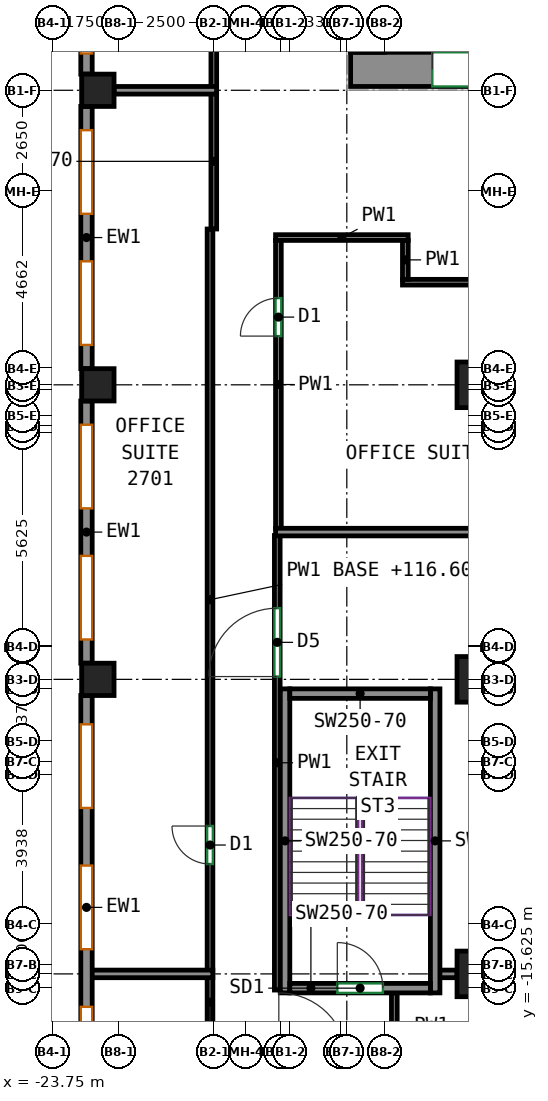
"""IFC4 building model, lengths in metres.
Left out: names, types, materials, properties, quantities, classifications, styles, units other than length and angle.
Written with IfcOpenShell. Run it as: python <this file> out.ifc"""

import sys

from ifc_helpers import new_model, si_unit, direction, frame, frame_2d, origin, origin_2d, place, context, subcontext, project, spatial, rectangle, extrude, source, transform, mapped, element, fill, save


model = new_model("IFC4")
c1 = context("Model", 3, precision=1e-05, world=origin(), true_north=direction((0.0, 1.0)))
c2 = subcontext(c1, "Body", "Model", "MODEL_VIEW")
j1 = project(units=[si_unit("LENGTHUNIT", "METRE"), si_unit("PLANEANGLEUNIT", "RADIAN")], contexts=[c1])
p1 = place(None, origin())
s1 = spatial("IfcSite", under=j1, at=p1, CompositionType="ELEMENT")
p2 = place(p1, origin())
s2 = spatial("IfcBuilding", under=s1, at=p2, CompositionType="ELEMENT")
p3 = place(p2, frame((0.0, 0.0, 116.6)))
s3 = spatial("IfcBuildingStorey", under=s2, at=p3, CompositionType="ELEMENT", Elevation=116.6)
m1 = source(origin(), c2, "Body", "SweptSolid", [
    extrude(rectangle(XDim=0.85, YDim=0.85, at=origin_2d()), origin(), (0.0, 0.0, 1.0), 3.72),
])
for number, where, z_axis, x_axis in (
    (1, (-22.55, -7.5, 0.0), (0.0, 0.0, 1.0), (1.0, 0.0, 0.0)),
    (2, (-22.55, 0.25, 0.0), (0.0, 0.0, 1.0), (1.0, 0.0, 0.0)),
    (3, (-22.55, 8.0, 0.0), (0.0, 0.0, 1.0), (1.0, 0.0, 0.0)),
):
    element("IfcColumn", number, at=place(p3, frame(where, z_axis=z_axis, x_axis=x_axis)), inside=s3, PredefinedType="COLUMN", context=c2, shape_type="MappedRepresentation", body=[
        mapped(m1, transform((0.0, 0.0, 0.0))),
    ])
m2 = source(origin(), c2, "Body", "SweptSolid", [
    extrude(rectangle(XDim=1.2, YDim=1.2, at=origin_2d()), origin(), (0.0, 0.0, 1.0), 3.72),
])
for number, where, z_axis, x_axis in (
    (4, (-12.5, -15.25, 0.0), (0.0, 0.0, 1.0), (1.0, 0.0, 0.0)),
    (5, (-12.5, -7.5, 0.0), (0.0, 0.0, 1.0), (1.0, 0.0, 0.0)),
    (6, (-12.5, 0.25, 0.0), (0.0, 0.0, 1.0), (1.0, 0.0, 0.0)),
):
    element("IfcColumn", number, at=place(p3, frame(where, z_axis=z_axis, x_axis=x_axis)), inside=s3, PredefinedType="COLUMN", context=c2, shape_type="MappedRepresentation", body=[
        mapped(m2, transform((0.0, 0.0, 0.0))),
    ])
m3 = source(origin(), c2, "Body", "SweptSolid", [
    extrude(rectangle(XDim=5.53, YDim=0.9, at=frame_2d((2.765, 0.0))), origin(), (0.0, 0.0, 1.0), 3.72),
])
p4 = place(p3, frame((-15.9, 8.55, 0.0), z_axis=(0.0, 0.0, 1.0), x_axis=(1.0, 0.0, 0.0)))
e7 = element("IfcWall", 7, at=p4, inside=s3, PredefinedType="SHEAR", context=c2, shape_type="MappedRepresentation", body=[
    mapped(m3, transform((0.0, 0.0, 0.0))),
])
p5 = place(p4, frame((2.15, 0.0, 0.0)))
e8 = element("IfcOpeningElement", 8, at=p5, cuts=e7, PredefinedType="OPENING", context=c2, shape_type="SweptSolid", body=[
    extrude(rectangle(XDim=1.2, YDim=2.1, at=frame_2d((0.6, 1.05))), frame((0.0, 0.46, 0.0), z_axis=(0.0, -1.0, 0.0), x_axis=(1.0, 0.0, 0.0)), (0.0, 0.0, 1.0), 0.92),
])
m4 = source(origin(), c2, "Body", "SweptSolid", [
    extrude(rectangle(XDim=8.0, YDim=0.25, at=frame_2d((4.0, 0.0))), origin(), (0.0, 0.0, 1.0), 3.72),
])
for number, where, z_axis, x_axis in (
    (9, (-17.625, -15.75, 0.0), (0.0, 0.0, 1.0), (0.0, 1.0, 0.0)),
    (10, (-13.675, -15.75, 0.0), (0.0, 0.0, 1.0), (0.0, 1.0, 0.0)),
):
    element("IfcWall", number, at=place(p3, frame(where, z_axis=z_axis, x_axis=x_axis)), inside=s3, PredefinedType="SHEAR", context=c2, shape_type="MappedRepresentation", body=[
        mapped(m4, transform((0.0, 0.0, 0.0))),
    ])
m5 = source(origin(), c2, "Body", "SweptSolid", [
    extrude(rectangle(XDim=3.7, YDim=0.25, at=frame_2d((1.85, 0.0))), origin(), (0.0, 0.0, 1.0), 3.72),
])
p6 = place(p3, frame((-17.5, -15.625, 0.0), z_axis=(0.0, 0.0, 1.0), x_axis=(1.0, 0.0, 0.0)))
e11 = element("IfcWall", 11, at=p6, inside=s3, PredefinedType="SHEAR", context=c2, shape_type="MappedRepresentation", body=[
    mapped(m5, transform((0.0, 0.0, 0.0))),
])
p7 = place(p6, frame((1.25, 0.0, 0.0)))
e12 = element("IfcOpeningElement", 12, at=p7, cuts=e11, PredefinedType="OPENING", context=c2, shape_type="SweptSolid", body=[
    extrude(rectangle(XDim=1.2, YDim=2.1, at=frame_2d((0.6, 1.05))), frame((0.0, 0.135, 0.0), z_axis=(0.0, -1.0, 0.0), x_axis=(1.0, 0.0, 0.0)), (0.0, 0.0, 1.0), 0.27),
])
p8 = place(p3, frame((-17.5, -7.875, 0.0), z_axis=(0.0, 0.0, 1.0), x_axis=(1.0, 0.0, 0.0)))
e13 = element("IfcWall", 13, at=p8, inside=s3, PredefinedType="SHEAR", context=c2, shape_type="MappedRepresentation", body=[
    mapped(m5, transform((0.0, 0.0, 0.0))),
])
m6 = source(origin(), c2, "Body", "SweptSolid", [
    extrude(rectangle(XDim=13.15, YDim=0.3, at=frame_2d((6.575, 0.0))), origin(), (0.0, 0.0, 1.0), 3.72),
])
p9 = place(p3, frame((-22.85, 21.575, 0.0), z_axis=(0.0, 0.0, 1.0), x_axis=(0.0, -1.0, 0.0)))
e14 = element("IfcWall", 14, at=p9, inside=s3, PredefinedType="SOLIDWALL", context=c2, shape_type="MappedRepresentation", body=[
    mapped(m6, transform((0.0, 0.0, 0.0))),
])
p10 = place(p9, frame((0.544, 0.0, 0.7)))
e15 = element("IfcOpeningElement", 15, at=p10, cuts=e14, PredefinedType="OPENING", context=c2, shape_type="SweptSolid", body=[
    extrude(rectangle(XDim=2.2, YDim=2.25, at=frame_2d((1.1, 1.125))), frame((0.0, 0.16, 0.0), z_axis=(0.0, -1.0, 0.0), x_axis=(1.0, 0.0, 0.0)), (0.0, 0.0, 1.0), 0.32),
])
p11 = place(p9, frame((3.831, 0.0, 0.7)))
e16 = element("IfcOpeningElement", 16, at=p11, cuts=e14, PredefinedType="OPENING", context=c2, shape_type="SweptSolid", body=[
    extrude(rectangle(XDim=2.2, YDim=2.25, at=frame_2d((1.1, 1.125))), frame((0.0, 0.16, 0.0), z_axis=(0.0, -1.0, 0.0), x_axis=(1.0, 0.0, 0.0)), (0.0, 0.0, 1.0), 0.32),
])
p12 = place(p9, frame((7.119, 0.0, 0.7)))
e17 = element("IfcOpeningElement", 17, at=p12, cuts=e14, PredefinedType="OPENING", context=c2, shape_type="SweptSolid", body=[
    extrude(rectangle(XDim=2.2, YDim=2.25, at=frame_2d((1.1, 1.125))), frame((0.0, 0.16, 0.0), z_axis=(0.0, -1.0, 0.0), x_axis=(1.0, 0.0, 0.0)), (0.0, 0.0, 1.0), 0.32),
])
p13 = place(p9, frame((10.406, 0.0, 0.7)))
e18 = element("IfcOpeningElement", 18, at=p13, cuts=e14, PredefinedType="OPENING", context=c2, shape_type="SweptSolid", body=[
    extrude(rectangle(XDim=2.2, YDim=2.25, at=frame_2d((1.1, 1.125))), frame((0.0, 0.16, 0.0), z_axis=(0.0, -1.0, 0.0), x_axis=(1.0, 0.0, 0.0)), (0.0, 0.0, 1.0), 0.32),
])
m7 = source(origin(), c2, "Body", "SweptSolid", [
    extrude(rectangle(XDim=6.9, YDim=0.3, at=frame_2d((3.45, 0.0))), origin(), (0.0, 0.0, 1.0), 3.72),
])
p14 = place(p3, frame((-22.85, 7.575, 0.0), z_axis=(0.0, 0.0, 1.0), x_axis=(0.0, -1.0, 0.0)))
e19 = element("IfcWall", 19, at=p14, inside=s3, PredefinedType="SOLIDWALL", context=c2, shape_type="MappedRepresentation", body=[
    mapped(m7, transform((0.0, 0.0, 0.0))),
])
p15 = place(p14, frame((0.625, 0.0, 0.7)))
e20 = element("IfcOpeningElement", 20, at=p15, cuts=e19, PredefinedType="OPENING", context=c2, shape_type="SweptSolid", body=[
    extrude(rectangle(XDim=2.2, YDim=2.25, at=frame_2d((1.1, 1.125))), frame((0.0, 0.16, 0.0), z_axis=(0.0, -1.0, 0.0), x_axis=(1.0, 0.0, 0.0)), (0.0, 0.0, 1.0), 0.32),
])
p16 = place(p14, frame((4.075, 0.0, 0.7)))
e21 = element("IfcOpeningElement", 21, at=p16, cuts=e19, PredefinedType="OPENING", context=c2, shape_type="SweptSolid", body=[
    extrude(rectangle(XDim=2.2, YDim=2.25, at=frame_2d((1.1, 1.125))), frame((0.0, 0.16, 0.0), z_axis=(0.0, -1.0, 0.0), x_axis=(1.0, 0.0, 0.0)), (0.0, 0.0, 1.0), 0.32),
])
p17 = place(p3, frame((-22.85, -0.175, 0.0), z_axis=(0.0, 0.0, 1.0), x_axis=(0.0, -1.0, 0.0)))
e22 = element("IfcWall", 22, at=p17, inside=s3, PredefinedType="SOLIDWALL", context=c2, shape_type="MappedRepresentation", body=[
    mapped(m7, transform((0.0, 0.0, 0.0))),
])
p18 = place(p17, frame((0.625, 0.0, 0.7)))
e23 = element("IfcOpeningElement", 23, at=p18, cuts=e22, PredefinedType="OPENING", context=c2, shape_type="SweptSolid", body=[
    extrude(rectangle(XDim=2.2, YDim=2.25, at=frame_2d((1.1, 1.125))), frame((0.0, 0.16, 0.0), z_axis=(0.0, -1.0, 0.0), x_axis=(1.0, 0.0, 0.0)), (0.0, 0.0, 1.0), 0.32),
])
p19 = place(p17, frame((4.075, 0.0, 0.7)))
e24 = element("IfcOpeningElement", 24, at=p19, cuts=e22, PredefinedType="OPENING", context=c2, shape_type="SweptSolid", body=[
    extrude(rectangle(XDim=2.2, YDim=2.25, at=frame_2d((1.1, 1.125))), frame((0.0, 0.16, 0.0), z_axis=(0.0, -1.0, 0.0), x_axis=(1.0, 0.0, 0.0)), (0.0, 0.0, 1.0), 0.32),
])
m8 = source(origin(), c2, "Body", "SweptSolid", [
    extrude(rectangle(XDim=11.15, YDim=0.3, at=frame_2d((5.575, 0.0))), origin(), (0.0, 0.0, 1.0), 3.72),
])
p20 = place(p3, frame((-22.85, -7.925, 0.0), z_axis=(0.0, 0.0, 1.0), x_axis=(0.0, -1.0, 0.0)))
e25 = element("IfcWall", 25, at=p20, inside=s3, PredefinedType="SOLIDWALL", context=c2, shape_type="MappedRepresentation", body=[
    mapped(m8, transform((0.0, 0.0, 0.0))),
])
p21 = place(p20, frame((0.758, 0.0, 0.7)))
e26 = element("IfcOpeningElement", 26, at=p21, cuts=e25, PredefinedType="OPENING", context=c2, shape_type="SweptSolid", body=[
    extrude(rectangle(XDim=2.2, YDim=2.25, at=frame_2d((1.1, 1.125))), frame((0.0, 0.16, 0.0), z_axis=(0.0, -1.0, 0.0), x_axis=(1.0, 0.0, 0.0)), (0.0, 0.0, 1.0), 0.32),
])
p22 = place(p20, frame((4.475, 0.0, 0.7)))
e27 = element("IfcOpeningElement", 27, at=p22, cuts=e25, PredefinedType="OPENING", context=c2, shape_type="SweptSolid", body=[
    extrude(rectangle(XDim=2.2, YDim=2.25, at=frame_2d((1.1, 1.125))), frame((0.0, 0.16, 0.0), z_axis=(0.0, -1.0, 0.0), x_axis=(1.0, 0.0, 0.0)), (0.0, 0.0, 1.0), 0.32),
])
p23 = place(p20, frame((8.192, 0.0, 0.7)))
e28 = element("IfcOpeningElement", 28, at=p23, cuts=e25, PredefinedType="OPENING", context=c2, shape_type="SweptSolid", body=[
    extrude(rectangle(XDim=2.2, YDim=2.25, at=frame_2d((1.1, 1.125))), frame((0.0, 0.16, 0.0), z_axis=(0.0, -1.0, 0.0), x_axis=(1.0, 0.0, 0.0)), (0.0, 0.0, 1.0), 0.32),
])
p24 = place(p3, frame((-19.6, -15.16, 0.0), z_axis=(0.0, 0.0, 1.0), x_axis=(0.0, 1.0, 0.0)))
e29 = element("IfcWall", 29, at=p24, inside=s3, PredefinedType="PARTITIONING", context=c2, shape_type="SweptSolid", body=[
    extrude(rectangle(XDim=19.51, YDim=0.15, at=frame_2d((9.755, 0.0))), origin(), (0.0, 0.0, 1.0), 3.07),
])
p25 = place(p24, frame((2.801, 0.0, 0.0)))
e30 = element("IfcOpeningElement", 30, at=p25, cuts=e29, PredefinedType="OPENING", context=c2, shape_type="SweptSolid", body=[
    extrude(rectangle(XDim=1.0, YDim=2.1, at=frame_2d((0.5, 1.05))), frame((0.0, 0.085, 0.0), z_axis=(0.0, -1.0, 0.0), x_axis=(1.0, 0.0, 0.0)), (0.0, 0.0, 1.0), 0.17),
])
p26 = place(p3, frame((-19.5, 4.35, 0.0), z_axis=(0.0, 0.0, 1.0), x_axis=(0.0, 1.0, 0.0)))
e31 = element("IfcWall", 31, at=p26, inside=s3, PredefinedType="PARTITIONING", context=c2, shape_type="SweptSolid", body=[
    extrude(rectangle(XDim=3.56, YDim=0.15, at=frame_2d((1.78, 0.0))), origin(), (0.0, 0.0, 1.0), 3.07),
])
p27 = place(p3, frame((-14.535, 2.95, 0.0), z_axis=(0.0, 0.0, 1.0), x_axis=(1.0, 0.0, 0.0)))
e32 = element("IfcWall", 32, at=p27, inside=s3, PredefinedType="PARTITIONING", context=c2, shape_type="SweptSolid", body=[
    extrude(rectangle(XDim=12.635, YDim=0.15, at=frame_2d((6.317, 0.0))), origin(), (0.0, 0.0, 1.0), 3.72),
])
p28 = place(p27, frame((10.333, 0.0, 0.0)))
e33 = element("IfcOpeningElement", 33, at=p28, cuts=e32, PredefinedType="OPENING", context=c2, shape_type="SweptSolid", body=[
    extrude(rectangle(XDim=0.9, YDim=2.1, at=frame_2d((0.45, 1.05))), frame((0.0, 0.085, 0.0), z_axis=(0.0, -1.0, 0.0), x_axis=(1.0, 0.0, 0.0)), (0.0, 0.0, 1.0), 0.17),
])
p29 = place(p3, frame((-14.46, 4.05, 0.0), z_axis=(0.0, 0.0, 1.0), x_axis=(0.0, -1.0, 0.0)))
e34 = element("IfcWall", 34, at=p29, inside=s3, PredefinedType="PARTITIONING", context=c2, shape_type="SweptSolid", body=[
    extrude(rectangle(XDim=1.025, YDim=0.15, at=frame_2d((0.513, 0.0))), origin(), (0.0, 0.0, 1.0), 3.72),
])
p30 = place(p3, frame((-17.875, 4.125, 0.0), z_axis=(0.0, 0.0, 1.0), x_axis=(1.0, 0.0, 0.0)))
e35 = element("IfcWall", 35, at=p30, inside=s3, PredefinedType="PARTITIONING", context=c2, shape_type="SweptSolid", body=[
    extrude(rectangle(XDim=3.49, YDim=0.15, at=frame_2d((1.745, 0.0))), origin(), (0.0, 0.0, 1.0), 3.72),
])
p31 = place(p3, frame((-17.8, -3.535, 0.0), z_axis=(0.0, 0.0, 1.0), x_axis=(0.0, 1.0, 0.0)))
e36 = element("IfcWall", 36, at=p31, inside=s3, PredefinedType="PARTITIONING", context=c2, shape_type="SweptSolid", body=[
    extrude(rectangle(XDim=7.585, YDim=0.15, at=frame_2d((3.792, 0.0))), origin(), (0.0, 0.0, 1.0), 3.72),
])
p32 = place(p31, frame((5.067, 0.0, 0.0)))
e37 = element("IfcOpeningElement", 37, at=p32, cuts=e36, PredefinedType="OPENING", context=c2, shape_type="SweptSolid", body=[
    extrude(rectangle(XDim=1.0, YDim=2.1, at=frame_2d((0.5, 1.05))), frame((0.0, 0.085, 0.0), z_axis=(0.0, -1.0, 0.0), x_axis=(1.0, 0.0, 0.0)), (0.0, 0.0, 1.0), 0.17),
])
p33 = place(p3, frame((-17.83, -15.675, 0.0), z_axis=(0.0, 0.0, 1.0), x_axis=(0.0, 1.0, 0.0)))
e38 = element("IfcWall", 38, at=p33, inside=s3, PredefinedType="PARTITIONING", context=c2, shape_type="SweptSolid", body=[
    extrude(rectangle(XDim=11.96, YDim=0.15, at=frame_2d((5.98, 0.0))), origin(), (0.0, 0.0, 1.0), 3.72),
])
p34 = place(p33, frame((8.249, 0.0, 0.0)))
e39 = element("IfcOpeningElement", 39, at=p34, cuts=e38, PredefinedType="OPENING", context=c2, shape_type="SweptSolid", body=[
    extrude(rectangle(XDim=1.8, YDim=2.1, at=frame_2d((0.9, 1.05))), frame((0.0, 0.085, 0.0), z_axis=(0.0, -1.0, 0.0), x_axis=(1.0, 0.0, 0.0)), (0.0, 0.0, 1.0), 0.17),
])
p35 = place(p3, frame((-19.6, -16.648, 0.0), z_axis=(0.0, 0.0, 1.0), x_axis=(0.0, 1.0, 0.0)))
e40 = element("IfcWall", 40, at=p35, inside=s3, PredefinedType="PARTITIONING", context=c2, shape_type="SweptSolid", body=[
    extrude(rectangle(XDim=1.308, YDim=0.15, at=frame_2d((0.654, 0.0))), origin(), (0.0, 0.0, 1.0), 3.07),
])
p36 = place(p3, frame((-14.75, -17.475, 0.0), z_axis=(0.0, 0.0, 1.0), x_axis=(0.0, 1.0, 0.0)))
e41 = element("IfcWall", 41, at=p36, inside=s3, PredefinedType="PARTITIONING", context=c2, shape_type="SweptSolid", body=[
    extrude(rectangle(XDim=1.725, YDim=0.15, at=frame_2d((0.863, 0.0))), origin(), (0.0, 0.0, 1.0), 3.72),
])
p37 = place(p3, frame((-19.5, 8.09, 0.0), z_axis=(0.0, 0.0, 1.0), x_axis=(0.0, 1.0, 0.0)))
e42 = element("IfcWall", 42, at=p37, inside=s3, PredefinedType="PARTITIONING", context=c2, shape_type="SweptSolid", body=[
    extrude(rectangle(XDim=13.82, YDim=0.15, at=frame_2d((6.91, 0.0))), origin(), (0.0, 0.0, 1.0), 3.07),
])
p38 = place(p37, frame((9.214, 0.0, 0.0)))
e43 = element("IfcOpeningElement", 43, at=p38, cuts=e42, PredefinedType="OPENING", context=c2, shape_type="SweptSolid", body=[
    extrude(rectangle(XDim=0.9, YDim=2.1, at=frame_2d((0.45, 1.05))), frame((0.0, 0.085, 0.0), z_axis=(0.0, -1.0, 0.0), x_axis=(1.0, 0.0, 0.0)), (0.0, 0.0, 1.0), 0.17),
])
p39 = place(p3, frame((-22.75, -15.25, 0.0), z_axis=(0.0, 0.0, 1.0), x_axis=(1.0, 0.0, 0.0)))
e44 = element("IfcWall", 44, at=p39, inside=s3, PredefinedType="PARTITIONING", context=c2, shape_type="SweptSolid", body=[
    extrude(rectangle(XDim=3.224, YDim=0.2, at=frame_2d((1.612, 0.0))), origin(), (0.0, 0.0, 1.0), 3.72),
])
p40 = place(p3, frame((-22.125, 8.0, 0.0), z_axis=(0.0, 0.0, 1.0), x_axis=(1.0, 0.0, 0.0)))
e45 = element("IfcWall", 45, at=p40, inside=s3, PredefinedType="PARTITIONING", context=c2, shape_type="SweptSolid", body=[
    extrude(rectangle(XDim=2.699, YDim=0.2, at=frame_2d((1.35, 0.0))), origin(), (0.0, 0.0, 1.0), 3.72),
])
p41 = place(p3, frame((-17.874, -3.625, 0.0), z_axis=(0.0, 0.0, 1.0), x_axis=(1.0, 0.0, 0.0)))
e46 = element("IfcWall", 46, at=p41, inside=s3, PredefinedType="PARTITIONING", context=c2, shape_type="SweptSolid", body=[
    extrude(rectangle(XDim=33.474, YDim=0.2, at=frame_2d((16.737, 0.0))), origin(), (0.0, 0.0, 1.0), 3.72),
])
p42 = place(p3, frame((-13.6, -15.25, 0.0), z_axis=(0.0, 0.0, 1.0), x_axis=(1.0, 0.0, 0.0)))
e47 = element("IfcWall", 47, at=p42, inside=s3, PredefinedType="PARTITIONING", context=c2, shape_type="SweptSolid", body=[
    extrude(rectangle(XDim=0.5, YDim=0.2, at=frame_2d((0.25, 0.0))), origin(), (0.0, 0.0, 1.0), 3.72),
])
p43 = place(p13, origin())
e48 = element("IfcWindow", 48, at=p43, inside=s3, PartitioningType="SINGLE_PANEL", PredefinedType="WINDOW", context=c2, shape_type="SweptSolid", body=[
    extrude(rectangle(XDim=2.2, YDim=2.25, at=frame_2d((1.1, 1.125))), frame((0.0, 0.03, 0.0), z_axis=(0.0, -1.0, 0.0), x_axis=(1.0, 0.0, 0.0)), (0.0, 0.0, 1.0), 0.06),
])
fill(e18, e48)
p44 = place(p15, origin())
e49 = element("IfcWindow", 49, at=p44, inside=s3, PartitioningType="SINGLE_PANEL", PredefinedType="WINDOW", context=c2, shape_type="SweptSolid", body=[
    extrude(rectangle(XDim=2.2, YDim=2.25, at=frame_2d((1.1, 1.125))), frame((0.0, 0.03, 0.0), z_axis=(0.0, -1.0, 0.0), x_axis=(1.0, 0.0, 0.0)), (0.0, 0.0, 1.0), 0.06),
])
fill(e20, e49)
p45 = place(p16, origin())
e50 = element("IfcWindow", 50, at=p45, inside=s3, PartitioningType="SINGLE_PANEL", PredefinedType="WINDOW", context=c2, shape_type="SweptSolid", body=[
    extrude(rectangle(XDim=2.2, YDim=2.25, at=frame_2d((1.1, 1.125))), frame((0.0, 0.03, 0.0), z_axis=(0.0, -1.0, 0.0), x_axis=(1.0, 0.0, 0.0)), (0.0, 0.0, 1.0), 0.06),
])
fill(e21, e50)
p46 = place(p18, origin())
e51 = element("IfcWindow", 51, at=p46, inside=s3, PartitioningType="SINGLE_PANEL", PredefinedType="WINDOW", context=c2, shape_type="SweptSolid", body=[
    extrude(rectangle(XDim=2.2, YDim=2.25, at=frame_2d((1.1, 1.125))), frame((0.0, 0.03, 0.0), z_axis=(0.0, -1.0, 0.0), x_axis=(1.0, 0.0, 0.0)), (0.0, 0.0, 1.0), 0.06),
])
fill(e23, e51)
p47 = place(p19, origin())
e52 = element("IfcWindow", 52, at=p47, inside=s3, PartitioningType="SINGLE_PANEL", PredefinedType="WINDOW", context=c2, shape_type="SweptSolid", body=[
    extrude(rectangle(XDim=2.2, YDim=2.25, at=frame_2d((1.1, 1.125))), frame((0.0, 0.03, 0.0), z_axis=(0.0, -1.0, 0.0), x_axis=(1.0, 0.0, 0.0)), (0.0, 0.0, 1.0), 0.06),
])
fill(e24, e52)
p48 = place(p21, origin())
e53 = element("IfcWindow", 53, at=p48, inside=s3, PartitioningType="SINGLE_PANEL", PredefinedType="WINDOW", context=c2, shape_type="SweptSolid", body=[
    extrude(rectangle(XDim=2.2, YDim=2.25, at=frame_2d((1.1, 1.125))), frame((0.0, 0.03, 0.0), z_axis=(0.0, -1.0, 0.0), x_axis=(1.0, 0.0, 0.0)), (0.0, 0.0, 1.0), 0.06),
])
fill(e26, e53)
p49 = place(p22, origin())
e54 = element("IfcWindow", 54, at=p49, inside=s3, PartitioningType="SINGLE_PANEL", PredefinedType="WINDOW", context=c2, shape_type="SweptSolid", body=[
    extrude(rectangle(XDim=2.2, YDim=2.25, at=frame_2d((1.1, 1.125))), frame((0.0, 0.03, 0.0), z_axis=(0.0, -1.0, 0.0), x_axis=(1.0, 0.0, 0.0)), (0.0, 0.0, 1.0), 0.06),
])
fill(e27, e54)
p50 = place(p23, origin())
e55 = element("IfcWindow", 55, at=p50, inside=s3, PartitioningType="SINGLE_PANEL", PredefinedType="WINDOW", context=c2, shape_type="SweptSolid", body=[
    extrude(rectangle(XDim=2.2, YDim=2.25, at=frame_2d((1.1, 1.125))), frame((0.0, 0.03, 0.0), z_axis=(0.0, -1.0, 0.0), x_axis=(1.0, 0.0, 0.0)), (0.0, 0.0, 1.0), 0.06),
])
fill(e28, e55)
p51 = place(p5, origin())
e56 = element("IfcDoor", 56, at=p51, inside=s3, OperationType="DOUBLE_DOOR_SINGLE_SWING", PredefinedType="DOOR", context=c2, shape_type="SweptSolid", body=[
    extrude(rectangle(XDim=1.2, YDim=2.1, at=frame_2d((0.6, 1.05))), frame((0.0, 0.355, 0.0), z_axis=(0.0, -1.0, 0.0), x_axis=(1.0, 0.0, 0.0)), (0.0, 0.0, 1.0), 0.05),
])
fill(e8, e56)
p52 = place(p7, origin())
e57 = element("IfcDoor", 57, at=p52, inside=s3, OperationType="DOUBLE_DOOR_SINGLE_SWING", PredefinedType="DOOR", context=c2, shape_type="SweptSolid", body=[
    extrude(rectangle(XDim=1.2, YDim=2.1, at=frame_2d((0.6, 1.05))), frame((0.0, 0.025, 0.0), z_axis=(0.0, -1.0, 0.0), x_axis=(1.0, 0.0, 0.0)), (0.0, 0.0, 1.0), 0.05),
])
fill(e12, e57)
p53 = place(p25, origin())
e58 = element("IfcDoor", 58, at=p53, inside=s3, OperationType="SINGLE_SWING_RIGHT", PredefinedType="DOOR", context=c2, shape_type="SweptSolid", body=[
    extrude(rectangle(XDim=1.0, YDim=2.1, at=frame_2d((0.5, 1.05))), frame((0.0, 0.025, 0.0), z_axis=(0.0, -1.0, 0.0), x_axis=(1.0, 0.0, 0.0)), (0.0, 0.0, 1.0), 0.05),
])
fill(e30, e58)
p54 = place(p34, origin())
e59 = element("IfcDoor", 59, at=p54, inside=s3, OperationType="DOUBLE_DOOR_SINGLE_SWING", PredefinedType="DOOR", context=c2, shape_type="SweptSolid", body=[
    extrude(rectangle(XDim=1.8, YDim=2.1, at=frame_2d((0.9, 1.05))), frame((0.0, 0.025, 0.0), z_axis=(0.0, -1.0, 0.0), x_axis=(1.0, 0.0, 0.0)), (0.0, 0.0, 1.0), 0.05),
])
fill(e39, e59)
p55 = place(p32, origin())
e60 = element("IfcDoor", 60, at=p55, inside=s3, OperationType="SINGLE_SWING_LEFT", PredefinedType="DOOR", context=c2, shape_type="SweptSolid", body=[
    extrude(rectangle(XDim=1.0, YDim=2.1, at=frame_2d((0.5, 1.05))), frame((0.0, 0.025, 0.0), z_axis=(0.0, -1.0, 0.0), x_axis=(1.0, 0.0, 0.0)), (0.0, 0.0, 1.0), 0.05),
])
fill(e37, e60)
save(model, sys.argv[1])
